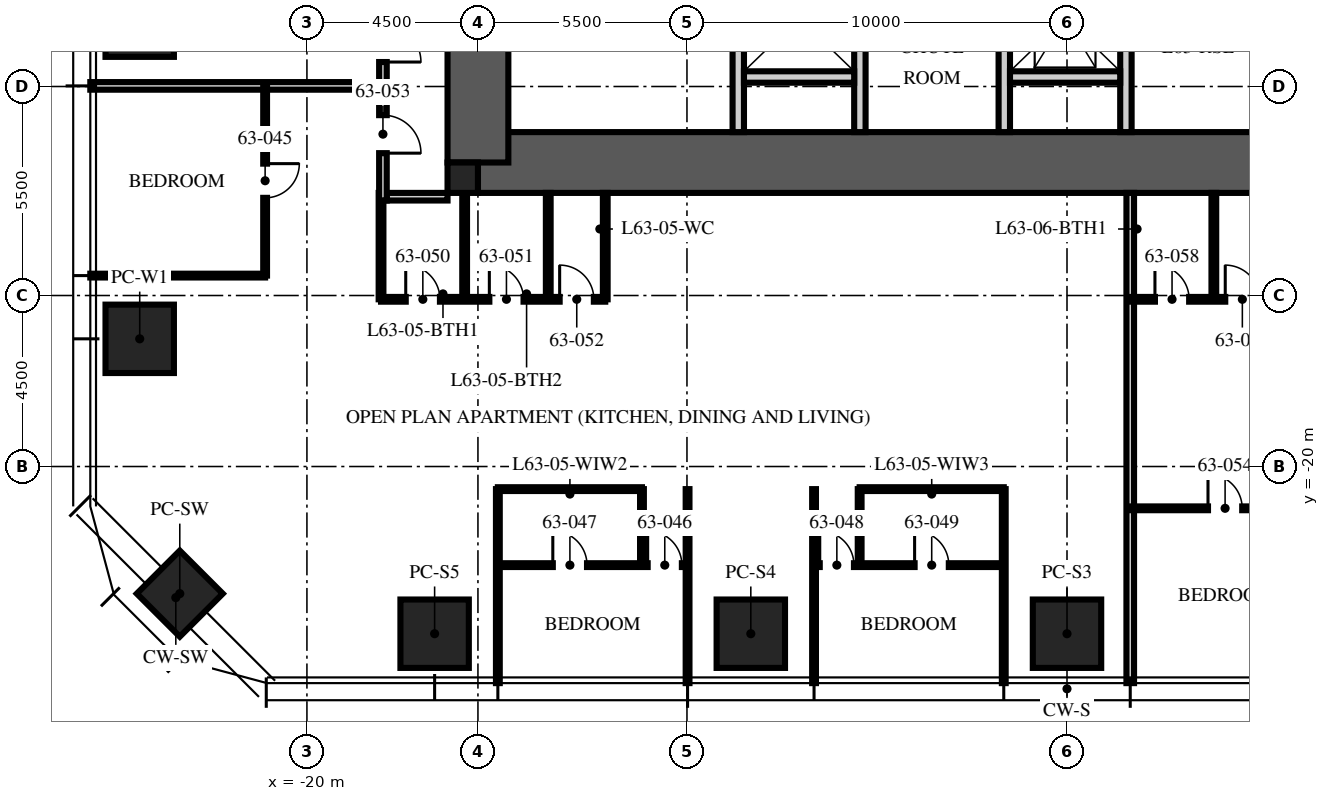
"""IFC4 building model, lengths in metres.
Left out: names, types, materials, properties, quantities, classifications, styles, units other than length and angle.
Written with IfcOpenShell. Run it as: python <this file> out.ifc"""

import sys

from ifc_helpers import new_model, si_unit, direction, frame, frame_2d, origin, origin_2d, place, context, subcontext, project, spatial, rectangle, extrude, element, fill, save


model = new_model("IFC4")
c1 = context("Model", 3, precision=1e-05, world=origin(), true_north=direction((0.0, 1.0)))
c2 = subcontext(c1, "Body", "Model", "MODEL_VIEW")
j1 = project(units=[si_unit("LENGTHUNIT", "METRE"), si_unit("PLANEANGLEUNIT", "RADIAN")], contexts=[c1])
p1 = place(None, origin())
s1 = spatial("IfcSite", under=j1, at=p1, CompositionType="ELEMENT")
p2 = place(p1, origin())
s2 = spatial("IfcBuilding", under=s1, at=p2, CompositionType="ELEMENT")
p3 = place(p2, frame((0.0, 0.0, 252.0)))
s3 = spatial("IfcBuildingStorey", under=s2, at=p3, CompositionType="ELEMENT", Elevation=252.0)
p4 = place(p3, frame((-15.5, -12.0, -0.25), z_axis=(0.0, 0.0, 1.0), x_axis=(1.0, 0.0, 0.0)))
e1 = element("IfcWall", 1, at=p4, inside=s3, PredefinedType="SHEAR", context=c2, shape_type="SweptSolid", body=[
    extrude(rectangle(XDim=31.0, YDim=1.6, at=frame_2d((15.5, 0.0))), origin(), (0.0, 0.0, 1.0), 3.75),
])
p5 = place(p3, frame((-15.5, -12.0, -0.25), z_axis=(0.0, 0.0, 1.0), x_axis=(0.0, 1.0, 0.0)))
e2 = element("IfcWall", 2, at=p5, inside=s3, PredefinedType="SHEAR", context=c2, shape_type="SweptSolid", body=[
    extrude(rectangle(XDim=24.0, YDim=1.6, at=frame_2d((12.0, 0.0))), origin(), (0.0, 0.0, 1.0), 3.75),
])
p6 = place(p5, frame((3.2, 0.0, 0.25)))
e3 = element("IfcOpeningElement", 3, at=p6, cuts=e2, PredefinedType="OPENING", context=c2, shape_type="SweptSolid", body=[
    extrude(rectangle(XDim=1.2, YDim=2.1, at=frame_2d((0.6, 1.05))), frame((0.0, 0.81, 0.0), z_axis=(0.0, -1.0, 0.0), x_axis=(1.0, 0.0, 0.0)), (0.0, 0.0, 1.0), 1.62),
])
p7 = place(p5, frame((19.3, 0.0, 0.25)))
e4 = element("IfcOpeningElement", 4, at=p7, cuts=e2, PredefinedType="OPENING", context=c2, shape_type="SweptSolid", body=[
    extrude(rectangle(XDim=1.8, YDim=2.1, at=frame_2d((0.9, 1.05))), frame((0.0, 0.81, 0.0), z_axis=(0.0, -1.0, 0.0), x_axis=(1.0, 0.0, 0.0)), (0.0, 0.0, 1.0), 1.62),
])
p8 = place(p3, frame((-15.9, -12.4, -0.25), z_axis=(0.0, 0.0, 1.0), x_axis=(1.0, 0.0, 0.0)))
e5 = element("IfcColumn", 5, at=p8, inside=s3, PredefinedType="COLUMN", context=c2, shape_type="SweptSolid", body=[
    extrude(rectangle(XDim=0.8, YDim=0.8, at=origin_2d()), origin(), (0.0, 0.0, 1.0), 3.75),
])
for number, where, z_axis, x_axis in (
    (6, (0.0, -24.4, 0.0), (0.0, 0.0, 1.0), (1.0, 0.0, 0.0)),
    (7, (-8.32, -24.4, 0.0), (0.0, 0.0, 1.0), (1.0, 0.0, 0.0)),
    (8, (-16.64, -24.4, 0.0), (0.0, 0.0, 1.0), (1.0, 0.0, 0.0)),
    (9, (-24.4, -16.64, 0.0), (0.0, 0.0, 1.0), (0.0, 1.0, 0.0)),
    (10, (-24.4, -8.32, 0.0), (0.0, 0.0, 1.0), (0.0, 1.0, 0.0)),
):
    element("IfcColumn", number, at=place(p3, frame(where, z_axis=z_axis, x_axis=x_axis)), inside=s3, PredefinedType="COLUMN", context=c2, shape_type="SweptSolid", body=[
        extrude(rectangle(XDim=1.8, YDim=1.8, at=origin_2d()), origin(), (0.0, 0.0, 1.0), 3.75),
    ])
p9 = place(p3, frame((-23.346, -23.346, 0.0), z_axis=(0.0, 0.0, 1.0), x_axis=(0.707106781187, -0.707106781187, 0.0)))
e11 = element("IfcColumn", 11, at=p9, inside=s3, PredefinedType="COLUMN", context=c2, shape_type="SweptSolid", body=[
    extrude(rectangle(XDim=1.6, YDim=1.6, at=origin_2d()), origin(), (0.0, 0.0, 1.0), 3.75),
])
p10 = place(p3, frame((-8.65, -11.2, 0.0), z_axis=(0.0, 0.0, 1.0), x_axis=(0.0, 1.0, 0.0)))
e12 = element("IfcWall", 12, at=p10, inside=s3, PredefinedType="PARTITIONING", context=c2, shape_type="SweptSolid", body=[
    extrude(rectangle(XDim=6.3, YDim=0.3, at=frame_2d((3.15, 0.0))), origin(), (0.0, 0.0, 1.0), 3.5),
])
p11 = place(p10, frame((2.45, 0.0, 0.0)))
e13 = element("IfcOpeningElement", 13, at=p11, cuts=e12, PredefinedType="OPENING", context=c2, shape_type="SweptSolid", body=[
    extrude(rectangle(XDim=1.1, YDim=2.1, at=frame_2d((0.55, 1.05))), frame((0.0, 0.16, 0.0), z_axis=(0.0, -1.0, 0.0), x_axis=(1.0, 0.0, 0.0)), (0.0, 0.0, 1.0), 0.32),
])
for number, where, z_axis, x_axis in (
    (14, (-5.45, -11.2, 0.0), (0.0, 0.0, 1.0), (0.0, 1.0, 0.0)),
    (15, (-1.65, -11.2, 0.0), (0.0, 0.0, 1.0), (0.0, 1.0, 0.0)),
    (16, (1.55, -11.2, 0.0), (0.0, 0.0, 1.0), (0.0, 1.0, 0.0)),
):
    element("IfcWall", number, at=place(p3, frame(where, z_axis=z_axis, x_axis=x_axis)), inside=s3, PredefinedType="PARTITIONING", context=c2, shape_type="SweptSolid", body=[
        extrude(rectangle(XDim=4.4, YDim=0.3, at=frame_2d((2.2, 0.0))), origin(), (0.0, 0.0, 1.0), 3.5),
    ])
for number, where, z_axis, x_axis in (
    (17, (-8.5, -9.75, 0.0), (0.0, 0.0, 1.0), (1.0, 0.0, 0.0)),
    (18, (-1.5, -9.75, 0.0), (0.0, 0.0, 1.0), (1.0, 0.0, 0.0)),
):
    element("IfcWall", number, at=place(p3, frame(where, z_axis=z_axis, x_axis=x_axis)), inside=s3, PredefinedType="PARTITIONING", context=c2, shape_type="SweptSolid", body=[
        extrude(rectangle(XDim=2.9, YDim=0.3, at=frame_2d((1.45, 0.0))), origin(), (0.0, 0.0, 1.0), 3.5),
    ])
p12 = place(p3, frame((-16.3, -12.9, 0.0), z_axis=(0.0, 0.0, 1.0), x_axis=(-1.0, 0.0, 0.0)))
e19 = element("IfcWall", 19, at=p12, inside=s3, PredefinedType="PARTITIONING", context=c2, shape_type="SweptSolid", body=[
    extrude(rectangle(XDim=1.6, YDim=0.2, at=frame_2d((0.8, 0.0))), origin(), (0.0, 0.0, 1.0), 2.3),
])
p13 = place(p3, frame((-18.1, -9.984, 0.0), z_axis=(0.0, 0.0, 1.0), x_axis=(-1.0, 0.0, 0.0)))
e20 = element("IfcWall", 20, at=p13, inside=s3, PredefinedType="PARTITIONING", context=c2, shape_type="SweptSolid", body=[
    extrude(rectangle(XDim=7.6, YDim=0.2, at=frame_2d((3.8, 0.0))), origin(), (0.0, 0.0, 1.0), 2.91),
])
p14 = place(p3, frame((-21.1, -14.976, 0.0), z_axis=(0.0, 0.0, 1.0), x_axis=(-1.0, 0.0, 0.0)))
e21 = element("IfcWall", 21, at=p14, inside=s3, PredefinedType="PARTITIONING", context=c2, shape_type="SweptSolid", body=[
    extrude(rectangle(XDim=4.6, YDim=0.1, at=frame_2d((2.3, 0.0))), origin(), (0.0, 0.0, 1.0), 2.91),
])
for number, where, z_axis, x_axis in (
    (22, (-14.976, -20.595, 0.0), (0.0, 0.0, 1.0), (0.0, -1.0, 0.0)),
    (23, (-9.984, -20.595, 0.0), (0.0, 0.0, 1.0), (0.0, -1.0, 0.0)),
    (24, (-6.656, -20.595, 0.0), (0.0, 0.0, 1.0), (0.0, -1.0, 0.0)),
    (25, (-1.664, -20.595, 0.0), (0.0, 0.0, 1.0), (0.0, -1.0, 0.0)),
):
    element("IfcWall", number, at=place(p3, frame(where, z_axis=z_axis, x_axis=x_axis)), inside=s3, PredefinedType="PARTITIONING", context=c2, shape_type="SweptSolid", body=[
        extrude(rectangle(XDim=5.105, YDim=0.1, at=frame_2d((2.552, 0.0))), origin(), (0.0, 0.0, 1.0), 2.91),
    ])
p15 = place(p3, frame((1.664, -12.8, 0.0), z_axis=(0.0, 0.0, 1.0), x_axis=(0.0, -1.0, 0.0)))
e26 = element("IfcWall", 26, at=p15, inside=s3, PredefinedType="PARTITIONING", context=c2, shape_type="SweptSolid", body=[
    extrude(rectangle(XDim=12.9, YDim=0.2, at=frame_2d((6.45, 0.0))), origin(), (0.0, 0.0, 1.0), 2.91),
])
p16 = place(p3, frame((-21.1, -9.984, 0.0), z_axis=(0.0, 0.0, 1.0), x_axis=(0.0, -1.0, 0.0)))
e27 = element("IfcWall", 27, at=p16, inside=s3, PredefinedType="PARTITIONING", context=c2, shape_type="SweptSolid", body=[
    extrude(rectangle(XDim=4.992, YDim=0.1, at=frame_2d((2.496, 0.0))), origin(), (0.0, 0.0, 1.0), 2.81),
])
p17 = place(p16, frame((2.046, 0.0, 0.0)))
e28 = element("IfcOpeningElement", 28, at=p17, cuts=e27, PredefinedType="OPENING", context=c2, shape_type="SweptSolid", body=[
    extrude(rectangle(XDim=0.9, YDim=2.1, at=frame_2d((0.45, 1.05))), frame((0.0, 0.06, 0.0), z_axis=(0.0, -1.0, 0.0), x_axis=(1.0, 0.0, 0.0)), (0.0, 0.0, 1.0), 0.12),
])
p18 = place(p3, frame((-14.976, -22.595, 0.0), z_axis=(0.0, 0.0, 1.0), x_axis=(1.0, 0.0, 0.0)))
e29 = element("IfcWall", 29, at=p18, inside=s3, PredefinedType="PARTITIONING", context=c2, shape_type="SweptSolid", body=[
    extrude(rectangle(XDim=4.992, YDim=0.1, at=frame_2d((2.496, 0.0))), origin(), (0.0, 0.0, 1.0), 2.81),
])
p19 = place(p18, frame((3.942, 0.0, 0.0)))
e30 = element("IfcOpeningElement", 30, at=p19, cuts=e29, PredefinedType="OPENING", context=c2, shape_type="SweptSolid", body=[
    extrude(rectangle(XDim=0.9, YDim=2.1, at=frame_2d((0.45, 1.05))), frame((0.0, 0.06, 0.0), z_axis=(0.0, -1.0, 0.0), x_axis=(1.0, 0.0, 0.0)), (0.0, 0.0, 1.0), 0.12),
])
p20 = place(p18, frame((1.446, 0.0, 0.0)))
e31 = element("IfcOpeningElement", 31, at=p20, cuts=e29, PredefinedType="OPENING", context=c2, shape_type="SweptSolid", body=[
    extrude(rectangle(XDim=0.9, YDim=2.1, at=frame_2d((0.45, 1.05))), frame((0.0, 0.06, 0.0), z_axis=(0.0, -1.0, 0.0), x_axis=(1.0, 0.0, 0.0)), (0.0, 0.0, 1.0), 0.12),
])
p21 = place(p3, frame((-11.184, -20.595, 0.0), z_axis=(0.0, 0.0, 1.0), x_axis=(0.0, -1.0, 0.0)))
e32 = element("IfcWall", 32, at=p21, inside=s3, PredefinedType="PARTITIONING", context=c2, shape_type="SweptSolid", body=[
    extrude(rectangle(XDim=2.0, YDim=0.1, at=frame_2d((1.0, 0.0))), origin(), (0.0, 0.0, 1.0), 3.5),
])
p22 = place(p3, frame((-14.976, -20.595, 0.0), z_axis=(0.0, 0.0, 1.0), x_axis=(1.0, 0.0, 0.0)))
e33 = element("IfcWall", 33, at=p22, inside=s3, PredefinedType="PARTITIONING", context=c2, shape_type="SweptSolid", body=[
    extrude(rectangle(XDim=3.792, YDim=0.1, at=frame_2d((1.896, 0.0))), origin(), (0.0, 0.0, 1.0), 2.81),
])
p23 = place(p3, frame((-6.656, -22.595, 0.0), z_axis=(0.0, 0.0, 1.0), x_axis=(1.0, 0.0, 0.0)))
e34 = element("IfcWall", 34, at=p23, inside=s3, PredefinedType="PARTITIONING", context=c2, shape_type="SweptSolid", body=[
    extrude(rectangle(XDim=4.992, YDim=0.1, at=frame_2d((2.496, 0.0))), origin(), (0.0, 0.0, 1.0), 2.81),
])
p24 = place(p23, frame((0.15, 0.0, 0.0)))
e35 = element("IfcOpeningElement", 35, at=p24, cuts=e34, PredefinedType="OPENING", context=c2, shape_type="SweptSolid", body=[
    extrude(rectangle(XDim=0.9, YDim=2.1, at=frame_2d((0.45, 1.05))), frame((0.0, 0.06, 0.0), z_axis=(0.0, -1.0, 0.0), x_axis=(1.0, 0.0, 0.0)), (0.0, 0.0, 1.0), 0.12),
])
p25 = place(p23, frame((2.646, 0.0, 0.0)))
e36 = element("IfcOpeningElement", 36, at=p25, cuts=e34, PredefinedType="OPENING", context=c2, shape_type="SweptSolid", body=[
    extrude(rectangle(XDim=0.9, YDim=2.1, at=frame_2d((0.45, 1.05))), frame((0.0, 0.06, 0.0), z_axis=(0.0, -1.0, 0.0), x_axis=(1.0, 0.0, 0.0)), (0.0, 0.0, 1.0), 0.12),
])
p26 = place(p3, frame((-5.456, -20.595, 0.0), z_axis=(0.0, 0.0, 1.0), x_axis=(0.0, -1.0, 0.0)))
e37 = element("IfcWall", 37, at=p26, inside=s3, PredefinedType="PARTITIONING", context=c2, shape_type="SweptSolid", body=[
    extrude(rectangle(XDim=2.0, YDim=0.1, at=frame_2d((1.0, 0.0))), origin(), (0.0, 0.0, 1.0), 3.5),
])
p27 = place(p3, frame((-5.456, -20.595, 0.0), z_axis=(0.0, 0.0, 1.0), x_axis=(1.0, 0.0, 0.0)))
e38 = element("IfcWall", 38, at=p27, inside=s3, PredefinedType="PARTITIONING", context=c2, shape_type="SweptSolid", body=[
    extrude(rectangle(XDim=3.792, YDim=0.1, at=frame_2d((1.896, 0.0))), origin(), (0.0, 0.0, 1.0), 2.81),
])
p28 = place(p3, frame((-18.05, -15.6, 0.0), z_axis=(0.0, 0.0, 1.0), x_axis=(1.0, 0.0, 0.0)))
e39 = element("IfcWall", 39, at=p28, inside=s3, PredefinedType="PARTITIONING", context=c2, shape_type="SweptSolid", body=[
    extrude(rectangle(XDim=5.9, YDim=0.125, at=frame_2d((2.95, 0.0))), origin(), (0.0, 0.0, 1.0), 2.3),
])
p29 = place(p28, frame((0.65, 0.0, 0.0)))
e40 = element("IfcOpeningElement", 40, at=p29, cuts=e39, PredefinedType="OPENING", context=c2, shape_type="SweptSolid", body=[
    extrude(rectangle(XDim=0.9, YDim=2.1, at=frame_2d((0.45, 1.05))), frame((0.0, 0.073, 0.0), z_axis=(0.0, -1.0, 0.0), x_axis=(1.0, 0.0, 0.0)), (0.0, 0.0, 1.0), 0.145),
])
p30 = place(p28, frame((2.85, 0.0, 0.0)))
e41 = element("IfcOpeningElement", 41, at=p30, cuts=e39, PredefinedType="OPENING", context=c2, shape_type="SweptSolid", body=[
    extrude(rectangle(XDim=0.9, YDim=2.1, at=frame_2d((0.45, 1.05))), frame((0.0, 0.073, 0.0), z_axis=(0.0, -1.0, 0.0), x_axis=(1.0, 0.0, 0.0)), (0.0, 0.0, 1.0), 0.145),
])
p31 = place(p28, frame((4.7, 0.0, 0.0)))
e42 = element("IfcOpeningElement", 42, at=p31, cuts=e39, PredefinedType="OPENING", context=c2, shape_type="SweptSolid", body=[
    extrude(rectangle(XDim=0.9, YDim=2.1, at=frame_2d((0.45, 1.05))), frame((0.0, 0.073, 0.0), z_axis=(0.0, -1.0, 0.0), x_axis=(1.0, 0.0, 0.0)), (0.0, 0.0, 1.0), 0.145),
])
for number, where, z_axis, x_axis in (
    (43, (-18.05, -12.8, 0.0), (0.0, 0.0, 1.0), (0.0, -1.0, 0.0)),
    (44, (-15.85, -12.8, 0.0), (0.0, 0.0, 1.0), (0.0, -1.0, 0.0)),
):
    element("IfcWall", number, at=place(p3, frame(where, z_axis=z_axis, x_axis=x_axis)), inside=s3, PredefinedType="PARTITIONING", context=c2, shape_type="SweptSolid", body=[
        extrude(rectangle(XDim=2.8, YDim=0.125, at=frame_2d((1.4, 0.0))), origin(), (0.0, 0.0, 1.0), 2.3),
    ])
for number, where, z_axis, x_axis in (
    (45, (-13.65, -12.8, 0.0), (0.0, 0.0, 1.0), (0.0, -1.0, 0.0)),
    (46, (-12.15, -12.8, 0.0), (0.0, 0.0, 1.0), (0.0, -1.0, 0.0)),
):
    element("IfcWall", number, at=place(p3, frame(where, z_axis=z_axis, x_axis=x_axis)), inside=s3, PredefinedType="PARTITIONING", context=c2, shape_type="SweptSolid", body=[
        extrude(rectangle(XDim=2.8, YDim=0.125, at=frame_2d((1.4, 0.0))), origin(), (0.0, 0.0, 1.0), 3.5),
    ])
p32 = place(p3, frame((1.664, -21.1, 0.0), z_axis=(0.0, 0.0, 1.0), x_axis=(1.0, 0.0, 0.0)))
e47 = element("IfcWall", 47, at=p32, inside=s3, PredefinedType="PARTITIONING", context=c2, shape_type="SweptSolid", body=[
    extrude(rectangle(XDim=4.992, YDim=0.1, at=frame_2d((2.496, 0.0))), origin(), (0.0, 0.0, 1.0), 2.81),
])
p33 = place(p32, frame((2.046, 0.0, 0.0)))
e48 = element("IfcOpeningElement", 48, at=p33, cuts=e47, PredefinedType="OPENING", context=c2, shape_type="SweptSolid", body=[
    extrude(rectangle(XDim=0.9, YDim=2.1, at=frame_2d((0.45, 1.05))), frame((0.0, 0.06, 0.0), z_axis=(0.0, -1.0, 0.0), x_axis=(1.0, 0.0, 0.0)), (0.0, 0.0, 1.0), 0.12),
])
p34 = place(p3, frame((1.664, -15.6, 0.0), z_axis=(0.0, 0.0, 1.0), x_axis=(1.0, 0.0, 0.0)))
e49 = element("IfcWall", 49, at=p34, inside=s3, PredefinedType="PARTITIONING", context=c2, shape_type="SweptSolid", body=[
    extrude(rectangle(XDim=3.7, YDim=0.125, at=frame_2d((1.85, 0.0))), origin(), (0.0, 0.0, 1.0), 2.81),
])
p35 = place(p34, frame((0.65, 0.0, 0.0)))
e50 = element("IfcOpeningElement", 50, at=p35, cuts=e49, PredefinedType="OPENING", context=c2, shape_type="SweptSolid", body=[
    extrude(rectangle(XDim=0.9, YDim=2.1, at=frame_2d((0.45, 1.05))), frame((0.0, 0.073, 0.0), z_axis=(0.0, -1.0, 0.0), x_axis=(1.0, 0.0, 0.0)), (0.0, 0.0, 1.0), 0.145),
])
p36 = place(p34, frame((2.5, 0.0, 0.0)))
e51 = element("IfcOpeningElement", 51, at=p36, cuts=e49, PredefinedType="OPENING", context=c2, shape_type="SweptSolid", body=[
    extrude(rectangle(XDim=0.9, YDim=2.1, at=frame_2d((0.45, 1.05))), frame((0.0, 0.073, 0.0), z_axis=(0.0, -1.0, 0.0), x_axis=(1.0, 0.0, 0.0)), (0.0, 0.0, 1.0), 0.145),
])
p37 = place(p3, frame((3.864, -12.8, 0.0), z_axis=(0.0, 0.0, 1.0), x_axis=(0.0, -1.0, 0.0)))
e52 = element("IfcWall", 52, at=p37, inside=s3, PredefinedType="PARTITIONING", context=c2, shape_type="SweptSolid", body=[
    extrude(rectangle(XDim=2.8, YDim=0.125, at=frame_2d((1.4, 0.0))), origin(), (0.0, 0.0, 1.0), 3.5),
])
p38 = place(p3, frame((-18.0, 13.0, 0.0), z_axis=(0.0, 0.0, 1.0), x_axis=(0.0, -1.0, 0.0)))
e53 = element("IfcWall", 53, at=p38, inside=s3, PredefinedType="PARTITIONING", context=c2, shape_type="SweptSolid", body=[
    extrude(rectangle(XDim=26.0, YDim=0.2, at=frame_2d((13.0, 0.0))), origin(), (0.0, 0.0, 1.0), 2.6),
])
p39 = place(p38, frame((9.6, 0.0, 0.0)))
e54 = element("IfcOpeningElement", 54, at=p39, cuts=e53, PredefinedType="OPENING", context=c2, shape_type="SweptSolid", body=[
    extrude(rectangle(XDim=1.0, YDim=2.2, at=frame_2d((0.5, 1.1))), frame((0.0, 0.11, 0.0), z_axis=(0.0, -1.0, 0.0), x_axis=(1.0, 0.0, 0.0)), (0.0, 0.0, 1.0), 0.22),
])
p40 = place(p38, frame((21.356, 0.0, 0.0)))
e55 = element("IfcOpeningElement", 55, at=p40, cuts=e53, PredefinedType="OPENING", context=c2, shape_type="SweptSolid", body=[
    extrude(rectangle(XDim=1.0, YDim=2.2, at=frame_2d((0.5, 1.1))), frame((0.0, 0.11, 0.0), z_axis=(0.0, -1.0, 0.0), x_axis=(1.0, 0.0, 0.0)), (0.0, 0.0, 1.0), 0.22),
])
p41 = place(p38, frame((23.754, 0.0, 0.0)))
e56 = element("IfcOpeningElement", 56, at=p41, cuts=e53, PredefinedType="OPENING", context=c2, shape_type="SweptSolid", body=[
    extrude(rectangle(XDim=1.0, YDim=2.2, at=frame_2d((0.5, 1.1))), frame((0.0, 0.11, 0.0), z_axis=(0.0, -1.0, 0.0), x_axis=(1.0, 0.0, 0.0)), (0.0, 0.0, 1.0), 0.22),
])
p42 = place(p40, origin())
e57 = element("IfcDoor", 57, at=p42, inside=s3, OperationType="SINGLE_SWING_RIGHT", PredefinedType="DOOR", context=c2, shape_type="SweptSolid", body=[
    extrude(rectangle(XDim=1.0, YDim=2.2, at=frame_2d((0.5, 1.1))), frame((0.0, 0.025, 0.0), z_axis=(0.0, -1.0, 0.0), x_axis=(1.0, 0.0, 0.0)), (0.0, 0.0, 1.0), 0.05),
])
fill(e55, e57)
p43 = place(p17, origin())
e58 = element("IfcDoor", 58, at=p43, inside=s3, OperationType="SINGLE_SWING_LEFT", PredefinedType="DOOR", context=c2, shape_type="SweptSolid", body=[
    extrude(rectangle(XDim=0.9, YDim=2.1, at=frame_2d((0.45, 1.05))), frame((0.0, 0.025, 0.0), z_axis=(0.0, -1.0, 0.0), x_axis=(1.0, 0.0, 0.0)), (0.0, 0.0, 1.0), 0.05),
])
fill(e28, e58)
p44 = place(p19, origin())
e59 = element("IfcDoor", 59, at=p44, inside=s3, OperationType="SINGLE_SWING_LEFT", PredefinedType="DOOR", context=c2, shape_type="SweptSolid", body=[
    extrude(rectangle(XDim=0.9, YDim=2.1, at=frame_2d((0.45, 1.05))), frame((0.0, 0.025, 0.0), z_axis=(0.0, -1.0, 0.0), x_axis=(1.0, 0.0, 0.0)), (0.0, 0.0, 1.0), 0.05),
])
fill(e30, e59)
p45 = place(p20, origin())
e60 = element("IfcDoor", 60, at=p45, inside=s3, OperationType="SINGLE_SWING_LEFT", PredefinedType="DOOR", context=c2, shape_type="SweptSolid", body=[
    extrude(rectangle(XDim=0.9, YDim=2.1, at=frame_2d((0.45, 1.05))), frame((0.0, 0.025, 0.0), z_axis=(0.0, -1.0, 0.0), x_axis=(1.0, 0.0, 0.0)), (0.0, 0.0, 1.0), 0.05),
])
fill(e31, e60)
p46 = place(p24, origin())
e61 = element("IfcDoor", 61, at=p46, inside=s3, OperationType="SINGLE_SWING_LEFT", PredefinedType="DOOR", context=c2, shape_type="SweptSolid", body=[
    extrude(rectangle(XDim=0.9, YDim=2.1, at=frame_2d((0.45, 1.05))), frame((0.0, 0.025, 0.0), z_axis=(0.0, -1.0, 0.0), x_axis=(1.0, 0.0, 0.0)), (0.0, 0.0, 1.0), 0.05),
])
fill(e35, e61)
p47 = place(p25, origin())
e62 = element("IfcDoor", 62, at=p47, inside=s3, OperationType="SINGLE_SWING_LEFT", PredefinedType="DOOR", context=c2, shape_type="SweptSolid", body=[
    extrude(rectangle(XDim=0.9, YDim=2.1, at=frame_2d((0.45, 1.05))), frame((0.0, 0.025, 0.0), z_axis=(0.0, -1.0, 0.0), x_axis=(1.0, 0.0, 0.0)), (0.0, 0.0, 1.0), 0.05),
])
fill(e36, e62)
p48 = place(p29, origin())
e63 = element("IfcDoor", 63, at=p48, inside=s3, OperationType="SINGLE_SWING_LEFT", PredefinedType="DOOR", context=c2, shape_type="SweptSolid", body=[
    extrude(rectangle(XDim=0.9, YDim=2.1, at=frame_2d((0.45, 1.05))), frame((0.0, 0.025, 0.0), z_axis=(0.0, -1.0, 0.0), x_axis=(1.0, 0.0, 0.0)), (0.0, 0.0, 1.0), 0.05),
])
fill(e40, e63)
p49 = place(p30, origin())
e64 = element("IfcDoor", 64, at=p49, inside=s3, OperationType="SINGLE_SWING_LEFT", PredefinedType="DOOR", context=c2, shape_type="SweptSolid", body=[
    extrude(rectangle(XDim=0.9, YDim=2.1, at=frame_2d((0.45, 1.05))), frame((0.0, 0.025, 0.0), z_axis=(0.0, -1.0, 0.0), x_axis=(1.0, 0.0, 0.0)), (0.0, 0.0, 1.0), 0.05),
])
fill(e41, e64)
p50 = place(p31, origin())
e65 = element("IfcDoor", 65, at=p50, inside=s3, OperationType="SINGLE_SWING_LEFT", PredefinedType="DOOR", context=c2, shape_type="SweptSolid", body=[
    extrude(rectangle(XDim=0.9, YDim=2.1, at=frame_2d((0.45, 1.05))), frame((0.0, 0.025, 0.0), z_axis=(0.0, -1.0, 0.0), x_axis=(1.0, 0.0, 0.0)), (0.0, 0.0, 1.0), 0.05),
])
fill(e42, e65)
p51 = place(p41, origin())
e66 = element("IfcDoor", 66, at=p51, inside=s3, OperationType="SINGLE_SWING_RIGHT", PredefinedType="DOOR", context=c2, shape_type="SweptSolid", body=[
    extrude(rectangle(XDim=1.0, YDim=2.2, at=frame_2d((0.5, 1.1))), frame((0.0, 0.025, 0.0), z_axis=(0.0, -1.0, 0.0), x_axis=(1.0, 0.0, 0.0)), (0.0, 0.0, 1.0), 0.05),
])
fill(e56, e66)
p52 = place(p33, origin())
e67 = element("IfcDoor", 67, at=p52, inside=s3, OperationType="SINGLE_SWING_LEFT", PredefinedType="DOOR", context=c2, shape_type="SweptSolid", body=[
    extrude(rectangle(XDim=0.9, YDim=2.1, at=frame_2d((0.45, 1.05))), frame((0.0, 0.025, 0.0), z_axis=(0.0, -1.0, 0.0), x_axis=(1.0, 0.0, 0.0)), (0.0, 0.0, 1.0), 0.05),
])
fill(e48, e67)
p53 = place(p35, origin())
e68 = element("IfcDoor", 68, at=p53, inside=s3, OperationType="SINGLE_SWING_LEFT", PredefinedType="DOOR", context=c2, shape_type="SweptSolid", body=[
    extrude(rectangle(XDim=0.9, YDim=2.1, at=frame_2d((0.45, 1.05))), frame((0.0, 0.025, 0.0), z_axis=(0.0, -1.0, 0.0), x_axis=(1.0, 0.0, 0.0)), (0.0, 0.0, 1.0), 0.05),
])
fill(e50, e68)
p54 = place(p36, origin())
e69 = element("IfcDoor", 69, at=p54, inside=s3, OperationType="SINGLE_SWING_LEFT", PredefinedType="DOOR", context=c2, shape_type="SweptSolid", body=[
    extrude(rectangle(XDim=0.9, YDim=2.1, at=frame_2d((0.45, 1.05))), frame((0.0, 0.025, 0.0), z_axis=(0.0, -1.0, 0.0), x_axis=(1.0, 0.0, 0.0)), (0.0, 0.0, 1.0), 0.05),
])
fill(e51, e69)
save(model, sys.argv[1])
